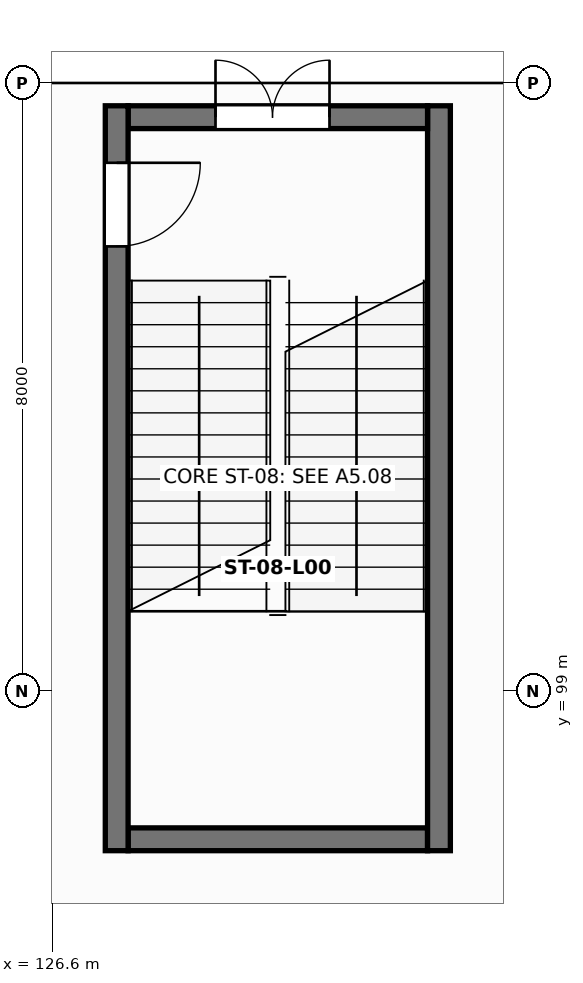
"""IFC4 building model, lengths in metres.
Left out: names, types, materials, properties, quantities, classifications, styles, units other than length and angle.
Written with IfcOpenShell. Run it as: python <this file> out.ifc"""

import sys

from ifc_helpers import new_model, si_unit, direction, frame, frame_2d, origin, place, context, subcontext, project, spatial, rectangle, extrude, element, fill, save


model = new_model("IFC4")
c1 = context("Model", 3, precision=1e-05, world=origin(), true_north=direction((0.0, 1.0)))
c2 = subcontext(c1, "Body", "Model", "MODEL_VIEW")
j1 = project(units=[si_unit("LENGTHUNIT", "METRE"), si_unit("PLANEANGLEUNIT", "RADIAN")], contexts=[c1])
p1 = place(None, origin())
s1 = spatial("IfcSite", under=j1, at=p1, CompositionType="ELEMENT")
p2 = place(p1, origin())
s2 = spatial("IfcBuilding", under=s1, at=p2, CompositionType="ELEMENT")
p3 = place(p2, origin())
s3 = spatial("IfcBuildingStorey", under=s2, at=p3, CompositionType="ELEMENT", Elevation=0.0)
p4 = place(p3, frame((127.6, 97.05, 0.0), z_axis=(0.0, 0.0, 1.0), x_axis=(1.0, 0.0, 0.0)))
e1 = element("IfcWall", 1, at=p4, inside=s3, PredefinedType="SHEAR", context=c2, shape_type="SweptSolid", body=[
    extrude(rectangle(XDim=3.94, YDim=0.3, at=frame_2d((1.97, 0.0))), origin(), (0.0, 0.0, 1.0), 5.755),
])
p5 = place(p3, frame((131.69, 96.9, 0.0), z_axis=(0.0, 0.0, 1.0), x_axis=(0.0, 1.0, 0.0)))
e2 = element("IfcWall", 2, at=p5, inside=s3, PredefinedType="SHEAR", context=c2, shape_type="SweptSolid", body=[
    extrude(rectangle(XDim=9.8, YDim=0.3, at=frame_2d((4.9, 0.0))), origin(), (0.0, 0.0, 1.0), 5.755),
])
p6 = place(p3, frame((131.54, 106.55, 0.0), z_axis=(0.0, 0.0, 1.0), x_axis=(-1.0, 0.0, 0.0)))
e3 = element("IfcWall", 3, at=p6, inside=s3, PredefinedType="SHEAR", context=c2, shape_type="SweptSolid", body=[
    extrude(rectangle(XDim=3.94, YDim=0.3, at=frame_2d((1.97, 0.0))), origin(), (0.0, 0.0, 1.0), 5.755),
])
p7 = place(p6, frame((1.29, 0.0, 0.0)))
e4 = element("IfcOpeningElement", 4, at=p7, cuts=e3, PredefinedType="OPENING", context=c2, shape_type="SweptSolid", body=[
    extrude(rectangle(XDim=1.5, YDim=2.2, at=frame_2d((0.75, 1.1))), frame((0.0, 0.16, 0.0), z_axis=(0.0, -1.0, 0.0), x_axis=(1.0, 0.0, 0.0)), (0.0, 0.0, 1.0), 0.32),
])
p8 = place(p3, frame((127.45, 106.7, 0.0), z_axis=(0.0, 0.0, 1.0), x_axis=(0.0, -1.0, 0.0)))
e5 = element("IfcWall", 5, at=p8, inside=s3, PredefinedType="SHEAR", context=c2, shape_type="SweptSolid", body=[
    extrude(rectangle(XDim=9.8, YDim=0.3, at=frame_2d((4.9, 0.0))), origin(), (0.0, 0.0, 1.0), 5.755),
])
p9 = place(p8, frame((0.75, 0.0, 0.0)))
e6 = element("IfcOpeningElement", 6, at=p9, cuts=e5, PredefinedType="OPENING", context=c2, shape_type="SweptSolid", body=[
    extrude(rectangle(XDim=1.1, YDim=2.15, at=frame_2d((0.55, 1.075))), frame((0.0, 0.16, 0.0), z_axis=(0.0, -1.0, 0.0), x_axis=(1.0, 0.0, 0.0)), (0.0, 0.0, 1.0), 0.32),
])
p10 = place(p9, origin())
e7 = element("IfcDoor", 7, at=p10, inside=s3, OperationType="SINGLE_SWING_LEFT", PredefinedType="DOOR", context=c2, shape_type="SweptSolid", body=[
    extrude(rectangle(XDim=1.1, YDim=2.15, at=frame_2d((0.55, 1.075))), frame((0.0, 0.025, 0.0), z_axis=(0.0, -1.0, 0.0), x_axis=(1.0, 0.0, 0.0)), (0.0, 0.0, 1.0), 0.05),
])
fill(e6, e7)
p11 = place(p7, frame((1.5, 0.0, 0.0), z_axis=(0.0, 0.0, 1.0), x_axis=(-1.0, 0.0, 0.0)))
e8 = element("IfcDoor", 8, at=p11, inside=s3, OperationType="DOUBLE_DOOR_SINGLE_SWING", PredefinedType="DOOR", context=c2, shape_type="SweptSolid", body=[
    extrude(rectangle(XDim=1.5, YDim=2.2, at=frame_2d((0.75, 1.1))), frame((0.0, 0.025, 0.0), z_axis=(0.0, -1.0, 0.0), x_axis=(1.0, 0.0, 0.0)), (0.0, 0.0, 1.0), 0.05),
])
fill(e4, e8)
save(model, sys.argv[1])
